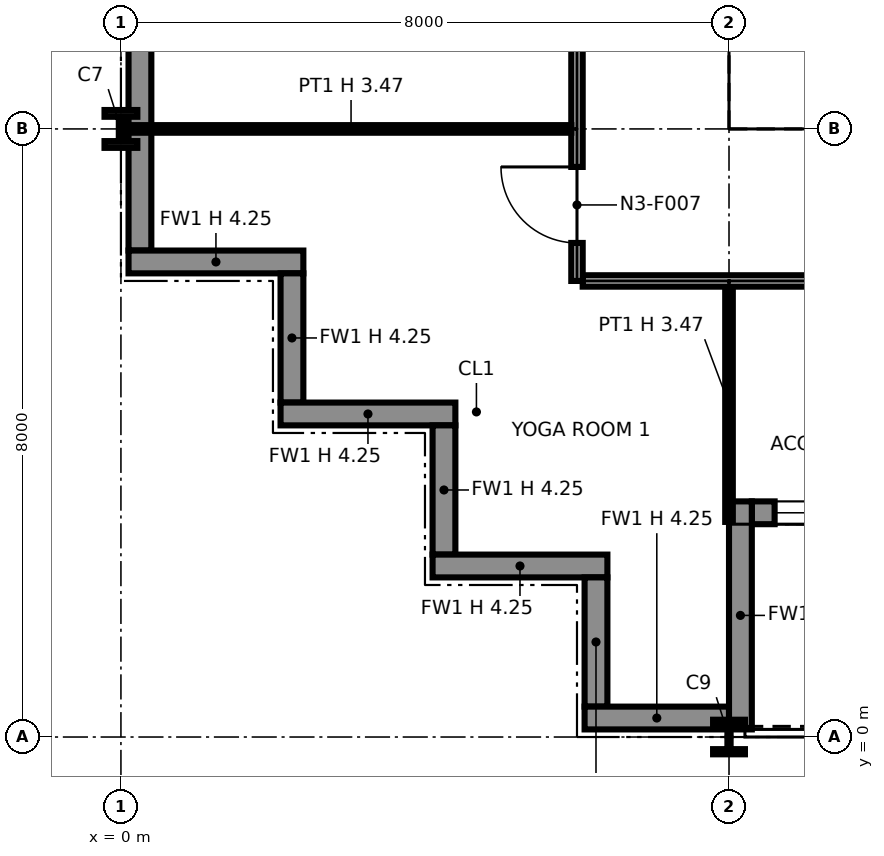
"""IFC4 building model, lengths in metres.
Left out: names, types, materials, properties, quantities, classifications, styles, units other than length and angle.
Written with IfcOpenShell. Run it as: python <this file> out.ifc"""

import sys

from ifc_helpers import new_model, si_unit, direction, frame, frame_2d, origin, origin_2d, place, context, subcontext, project, spatial, polyline, rectangle, i_section, outline, extrude, element, fill, save


model = new_model("IFC4")
c1 = context("Model", 3, precision=1e-05, world=origin(), true_north=direction((0.0, 1.0)))
c2 = subcontext(c1, "Body", "Model", "MODEL_VIEW")
j1 = project(units=[si_unit("LENGTHUNIT", "METRE"), si_unit("PLANEANGLEUNIT", "RADIAN")], contexts=[c1])
p1 = place(None, origin())
s1 = spatial("IfcSite", under=j1, at=p1, CompositionType="ELEMENT")
p2 = place(p1, origin())
s2 = spatial("IfcBuilding", under=s1, at=p2, CompositionType="ELEMENT")
p3 = place(p2, frame((0.0, 0.0, 70.0)))
s3 = spatial("IfcBuildingStorey", under=s2, at=p3, CompositionType="ELEMENT", Elevation=70.0)
p4 = place(p3, frame((0.0, 8.0, 0.0), z_axis=(0.0, 0.0, 1.0), x_axis=(1.0, 0.0, 0.0)))
e1 = element("IfcColumn", 1, at=p4, inside=s3, PredefinedType="COLUMN", context=c2, shape_type="SweptSolid", body=[
    extrude(i_section(OverallWidth=0.432, OverallDepth=0.498, WebThickness=0.056, FlangeThickness=0.089, at=origin_2d()), origin(), (0.0, 0.0, 1.0), 4.25),
])
p5 = place(p3, frame((8.0, 0.0, 0.0), z_axis=(0.0, 0.0, 1.0), x_axis=(1.0, 0.0, 0.0)))
e2 = element("IfcColumn", 2, at=p5, inside=s3, PredefinedType="COLUMN", context=c2, shape_type="SweptSolid", body=[
    extrude(i_section(OverallWidth=0.419, OverallDepth=0.455, WebThickness=0.042, FlangeThickness=0.068, at=origin_2d()), origin(), (0.0, 0.0, 1.0), 4.25),
])
p6 = place(p3, frame((8.0, 8.0, 0.0), z_axis=(0.0, 0.0, 1.0), x_axis=(1.0, 0.0, 0.0)))
e3 = element("IfcColumn", 3, at=p6, inside=s3, PredefinedType="COLUMN", context=c2, shape_type="SweptSolid", body=[
    extrude(i_section(OverallWidth=0.406, OverallDepth=0.417, WebThickness=0.03, FlangeThickness=0.048, at=origin_2d()), origin(), (0.0, 0.0, 1.0), 4.25),
])
p7 = place(p3, frame((0.25, 16.0, 0.0), z_axis=(0.0, 0.0, 1.0), x_axis=(0.0, -1.0, 0.0)))
e4 = element("IfcWall", 4, at=p7, inside=s3, PredefinedType="SOLIDWALL", context=c2, shape_type="SweptSolid", body=[
    extrude(rectangle(XDim=9.6, YDim=0.3, at=frame_2d((4.8, 0.0))), origin(), (0.0, 0.0, 1.0), 4.25),
])
p8 = place(p3, frame((0.1, 6.25, 0.0), z_axis=(0.0, 0.0, 1.0), x_axis=(1.0, 0.0, 0.0)))
e5 = element("IfcWall", 5, at=p8, inside=s3, PredefinedType="SOLIDWALL", context=c2, shape_type="SweptSolid", body=[
    extrude(rectangle(XDim=2.3, YDim=0.3, at=frame_2d((1.15, 0.0))), origin(), (0.0, 0.0, 1.0), 4.25),
])
p9 = place(p3, frame((2.25, 6.1, 0.0), z_axis=(0.0, 0.0, 1.0), x_axis=(0.0, -1.0, 0.0)))
e6 = element("IfcWall", 6, at=p9, inside=s3, PredefinedType="SOLIDWALL", context=c2, shape_type="SweptSolid", body=[
    extrude(rectangle(XDim=1.7, YDim=0.3, at=frame_2d((0.85, 0.0))), origin(), (0.0, 0.0, 1.0), 4.25),
])
p10 = place(p3, frame((2.1, 4.25, 0.0), z_axis=(0.0, 0.0, 1.0), x_axis=(1.0, 0.0, 0.0)))
e7 = element("IfcWall", 7, at=p10, inside=s3, PredefinedType="SOLIDWALL", context=c2, shape_type="SweptSolid", body=[
    extrude(rectangle(XDim=2.3, YDim=0.3, at=frame_2d((1.15, 0.0))), origin(), (0.0, 0.0, 1.0), 4.25),
])
p11 = place(p3, frame((4.25, 4.1, 0.0), z_axis=(0.0, 0.0, 1.0), x_axis=(0.0, -1.0, 0.0)))
e8 = element("IfcWall", 8, at=p11, inside=s3, PredefinedType="SOLIDWALL", context=c2, shape_type="SweptSolid", body=[
    extrude(rectangle(XDim=1.7, YDim=0.3, at=frame_2d((0.85, 0.0))), origin(), (0.0, 0.0, 1.0), 4.25),
])
p12 = place(p3, frame((4.1, 2.25, 0.0), z_axis=(0.0, 0.0, 1.0), x_axis=(1.0, 0.0, 0.0)))
e9 = element("IfcWall", 9, at=p12, inside=s3, PredefinedType="SOLIDWALL", context=c2, shape_type="SweptSolid", body=[
    extrude(rectangle(XDim=2.3, YDim=0.3, at=frame_2d((1.15, 0.0))), origin(), (0.0, 0.0, 1.0), 4.25),
])
p13 = place(p3, frame((6.25, 2.1, 0.0), z_axis=(0.0, 0.0, 1.0), x_axis=(0.0, -1.0, 0.0)))
e10 = element("IfcWall", 10, at=p13, inside=s3, PredefinedType="SOLIDWALL", context=c2, shape_type="SweptSolid", body=[
    extrude(rectangle(XDim=1.7, YDim=0.3, at=frame_2d((0.85, 0.0))), origin(), (0.0, 0.0, 1.0), 4.25),
])
p14 = place(p3, frame((6.1, 0.25, 0.0), z_axis=(0.0, 0.0, 1.0), x_axis=(1.0, 0.0, 0.0)))
e11 = element("IfcWall", 11, at=p14, inside=s3, PredefinedType="SOLIDWALL", context=c2, shape_type="SweptSolid", body=[
    extrude(rectangle(XDim=1.9, YDim=0.3, at=frame_2d((0.95, 0.0))), origin(), (0.0, 0.0, 1.0), 4.25),
])
p15 = place(p3, frame((8.3, 2.95, 0.0), z_axis=(0.0, 0.0, 1.0), x_axis=(1.0, 0.0, 0.0)))
e12 = element("IfcWall", 12, at=p15, inside=s3, PredefinedType="SOLIDWALL", context=c2, shape_type="SweptSolid", body=[
    extrude(rectangle(XDim=7.4, YDim=0.3, at=frame_2d((3.7, 0.0))), origin(), (0.0, 0.0, 1.0), 4.25),
])
p16 = place(p15, frame((0.3, 0.0, 0.9)))
e13 = element("IfcOpeningElement", 13, at=p16, cuts=e12, PredefinedType="OPENING", context=c2, shape_type="SweptSolid", body=[
    extrude(rectangle(XDim=2.8, YDim=2.2, at=frame_2d((1.4, 1.1))), frame((0.0, 0.16, 0.0), z_axis=(0.0, -1.0, 0.0), x_axis=(1.0, 0.0, 0.0)), (0.0, 0.0, 1.0), 0.32),
])
p17 = place(p15, frame((4.7, 0.0, 0.0)))
e14 = element("IfcOpeningElement", 14, at=p17, cuts=e12, PredefinedType="OPENING", context=c2, shape_type="SweptSolid", body=[
    extrude(rectangle(XDim=2.0, YDim=2.4, at=frame_2d((1.0, 1.2))), frame((0.0, 0.16, 0.0), z_axis=(0.0, -1.0, 0.0), x_axis=(1.0, 0.0, 0.0)), (0.0, 0.0, 1.0), 0.32),
])
p18 = place(p3, frame((8.15, 0.1, 0.0), z_axis=(0.0, 0.0, 1.0), x_axis=(0.0, 1.0, 0.0)))
e15 = element("IfcWall", 15, at=p18, inside=s3, PredefinedType="SOLIDWALL", context=c2, shape_type="SweptSolid", body=[
    extrude(rectangle(XDim=3.0, YDim=0.3, at=frame_2d((1.5, 0.0))), origin(), (0.0, 0.0, 1.0), 3.469),
])
p19 = place(p3, frame((8.65, 8.75, 0.0), z_axis=(0.0, 0.0, 1.0), x_axis=(1.0, 0.0, 0.0)))
e16 = element("IfcWall", 16, at=p19, inside=s3, PredefinedType="PARTITIONING", context=c2, shape_type="SweptSolid", body=[
    extrude(outline(polyline([(0.0, 0.0), (14.7, 0.0), (14.7, 4.25), (7.469, 4.25), (7.469, 3.632), (7.231, 3.632), (7.23, 4.25), (0.0, 4.25), (0.0, 0.0)])), frame((0.0, 0.1, 0.0), z_axis=(0.0, -1.0, 0.0), x_axis=(1.0, 0.0, 0.0)), (0.0, 0.0, 1.0), 0.2),
])
p20 = place(p19, frame((1.3, 0.0, 0.0)))
e17 = element("IfcOpeningElement", 17, at=p20, cuts=e16, PredefinedType="OPENING", context=c2, shape_type="SweptSolid", body=[
    extrude(rectangle(XDim=1.4, YDim=2.1, at=frame_2d((0.7, 1.05))), frame((0.0, 0.11, 0.0), z_axis=(0.0, -1.0, 0.0), x_axis=(1.0, 0.0, 0.0)), (0.0, 0.0, 1.0), 0.22),
])
p21 = place(p19, frame((4.6, 0.0, 0.0)))
e18 = element("IfcOpeningElement", 18, at=p21, cuts=e16, PredefinedType="OPENING", context=c2, shape_type="SweptSolid", body=[
    extrude(rectangle(XDim=1.4, YDim=2.1, at=frame_2d((0.7, 1.05))), frame((0.0, 0.11, 0.0), z_axis=(0.0, -1.0, 0.0), x_axis=(1.0, 0.0, 0.0)), (0.0, 0.0, 1.0), 0.22),
])
p22 = place(p19, frame((10.4, 0.0, 0.0)))
e19 = element("IfcOpeningElement", 19, at=p22, cuts=e16, PredefinedType="OPENING", context=c2, shape_type="SweptSolid", body=[
    extrude(rectangle(XDim=1.2, YDim=2.1, at=frame_2d((0.6, 1.05))), frame((0.0, 0.11, 0.0), z_axis=(0.0, -1.0, 0.0), x_axis=(1.0, 0.0, 0.0)), (0.0, 0.0, 1.0), 0.22),
])
p23 = place(p3, frame((8.75, 8.85, 0.0), z_axis=(0.0, 0.0, 1.0), x_axis=(0.0, 1.0, 0.0)))
e20 = element("IfcWall", 20, at=p23, inside=s3, PredefinedType="PARTITIONING", context=c2, shape_type="SweptSolid", body=[
    extrude(outline(polyline([(0.0, 0.0), (14.3, 0.0), (14.3, 4.25), (10.231, 4.25), (10.23, 3.789), (10.07, 3.789), (10.069, 4.25), (7.27, 4.25), (7.269, 3.632), (7.031, 3.632), (7.031, 4.25), (0.0, 4.25), (0.0, 0.0)])), frame((0.0, 0.1, 0.0), z_axis=(0.0, -1.0, 0.0), x_axis=(1.0, 0.0, 0.0)), (0.0, 0.0, 1.0), 0.2),
])
p24 = place(p23, frame((8.3, 0.0, 0.0)))
e21 = element("IfcOpeningElement", 21, at=p24, cuts=e20, PredefinedType="OPENING", context=c2, shape_type="SweptSolid", body=[
    extrude(rectangle(XDim=1.8, YDim=2.1, at=frame_2d((0.9, 1.05))), frame((0.0, 0.11, 0.0), z_axis=(0.0, -1.0, 0.0), x_axis=(1.0, 0.0, 0.0)), (0.0, 0.0, 1.0), 0.22),
])
p25 = place(p3, frame((8.0, 2.83, 0.0), z_axis=(0.0, 0.0, 1.0), x_axis=(0.0, 1.0, 0.0)))
e22 = element("IfcWall", 22, at=p25, inside=s3, PredefinedType="PARTITIONING", context=c2, shape_type="SweptSolid", body=[
    extrude(rectangle(XDim=3.095, YDim=0.1, at=frame_2d((1.547, 0.0))), origin(), (0.0, 0.0, 1.0), 3.47),
])
p26 = place(p3, frame((6.075, 6.0, 0.0), z_axis=(0.0, 0.0, 1.0), x_axis=(1.0, 0.0, 0.0)))
e23 = element("IfcWall", 23, at=p26, inside=s3, PredefinedType="PARTITIONING", context=c2, shape_type="SweptSolid", body=[
    extrude(rectangle(XDim=19.85, YDim=0.15, at=frame_2d((9.925, 0.0))), origin(), (0.0, 0.0, 1.0), 4.25),
])
p27 = place(p26, frame((12.425, 0.0, 0.0), z_axis=(0.0, 0.0, 1.0), x_axis=(-1.0, 0.0, 0.0)))
e24 = element("IfcOpeningElement", 24, at=p27, cuts=e23, PredefinedType="OPENING", context=c2, shape_type="SweptSolid", body=[
    extrude(rectangle(XDim=1.0, YDim=2.1, at=frame_2d((0.5, 1.05))), frame((0.0, 0.085, 0.0), z_axis=(0.0, -1.0, 0.0), x_axis=(1.0, 0.0, 0.0)), (0.0, 0.0, 1.0), 0.17),
])
p28 = place(p26, frame((16.425, 0.0, 0.0), z_axis=(0.0, 0.0, 1.0), x_axis=(-1.0, 0.0, 0.0)))
e25 = element("IfcOpeningElement", 25, at=p28, cuts=e23, PredefinedType="OPENING", context=c2, shape_type="SweptSolid", body=[
    extrude(rectangle(XDim=1.0, YDim=2.1, at=frame_2d((0.5, 1.05))), frame((0.0, 0.085, 0.0), z_axis=(0.0, -1.0, 0.0), x_axis=(1.0, 0.0, 0.0)), (0.0, 0.0, 1.0), 0.17),
])
p29 = place(p26, frame((4.425, 0.0, 0.0), z_axis=(0.0, 0.0, 1.0), x_axis=(-1.0, 0.0, 0.0)))
e26 = element("IfcOpeningElement", 26, at=p29, cuts=e23, PredefinedType="OPENING", context=c2, shape_type="SweptSolid", body=[
    extrude(rectangle(XDim=1.0, YDim=2.1, at=frame_2d((0.5, 1.05))), frame((0.0, 0.085, 0.0), z_axis=(0.0, -1.0, 0.0), x_axis=(1.0, 0.0, 0.0)), (0.0, 0.0, 1.0), 0.17),
])
p30 = place(p26, frame((8.425, 0.0, 0.0), z_axis=(0.0, 0.0, 1.0), x_axis=(-1.0, 0.0, 0.0)))
e27 = element("IfcOpeningElement", 27, at=p30, cuts=e23, PredefinedType="OPENING", context=c2, shape_type="SweptSolid", body=[
    extrude(rectangle(XDim=1.0, YDim=2.1, at=frame_2d((0.5, 1.05))), frame((0.0, 0.085, 0.0), z_axis=(0.0, -1.0, 0.0), x_axis=(1.0, 0.0, 0.0)), (0.0, 0.0, 1.0), 0.17),
])
p31 = place(p26, frame((19.425, 0.0, 0.0), z_axis=(0.0, 0.0, 1.0), x_axis=(-1.0, 0.0, 0.0)))
e28 = element("IfcOpeningElement", 28, at=p31, cuts=e23, PredefinedType="OPENING", context=c2, shape_type="SweptSolid", body=[
    extrude(rectangle(XDim=1.0, YDim=2.1, at=frame_2d((0.5, 1.05))), frame((0.0, 0.085, 0.0), z_axis=(0.0, -1.0, 0.0), x_axis=(1.0, 0.0, 0.0)), (0.0, 0.0, 1.0), 0.17),
])
p32 = place(p3, frame((6.0, 6.0, 0.0), z_axis=(0.0, 0.0, 1.0), x_axis=(0.0, 1.0, 0.0)))
e29 = element("IfcWall", 29, at=p32, inside=s3, PredefinedType="PARTITIONING", context=c2, shape_type="SweptSolid", body=[
    extrude(outline(polyline([(0.0, 0.0), (19.925, 0.0), (19.925, 4.25), (18.3, 4.25), (18.298, 3.47), (17.702, 3.47), (17.7, 4.25), (14.3, 4.25), (14.298, 3.47), (13.702, 3.47), (13.7, 4.25), (10.3, 4.25), (10.298, 3.47), (9.702, 3.47), (9.7, 4.25), (6.3, 4.25), (6.298, 3.47), (5.702, 3.47), (5.7, 4.25), (2.3, 4.25), (2.298, 3.47), (1.702, 3.47), (1.7, 4.25), (0.0, 4.25), (0.0, 0.0)])), frame((0.0, 0.075, 0.0), z_axis=(0.0, -1.0, 0.0), x_axis=(1.0, 0.0, 0.0)), (0.0, 0.0, 1.0), 0.15),
])
p33 = place(p32, frame((0.5, 0.0, 0.0)))
e30 = element("IfcOpeningElement", 30, at=p33, cuts=e29, PredefinedType="OPENING", context=c2, shape_type="SweptSolid", body=[
    extrude(rectangle(XDim=1.0, YDim=2.1, at=frame_2d((0.5, 1.05))), frame((0.0, 0.085, 0.0), z_axis=(0.0, -1.0, 0.0), x_axis=(1.0, 0.0, 0.0)), (0.0, 0.0, 1.0), 0.17),
])
p34 = place(p32, frame((3.5, 0.0, 0.0)))
e31 = element("IfcOpeningElement", 31, at=p34, cuts=e29, PredefinedType="OPENING", context=c2, shape_type="SweptSolid", body=[
    extrude(rectangle(XDim=1.0, YDim=2.1, at=frame_2d((0.5, 1.05))), frame((0.0, 0.085, 0.0), z_axis=(0.0, -1.0, 0.0), x_axis=(1.0, 0.0, 0.0)), (0.0, 0.0, 1.0), 0.17),
])
p35 = place(p32, frame((7.5, 0.0, 0.0)))
e32 = element("IfcOpeningElement", 32, at=p35, cuts=e29, PredefinedType="OPENING", context=c2, shape_type="SweptSolid", body=[
    extrude(rectangle(XDim=1.0, YDim=2.1, at=frame_2d((0.5, 1.05))), frame((0.0, 0.085, 0.0), z_axis=(0.0, -1.0, 0.0), x_axis=(1.0, 0.0, 0.0)), (0.0, 0.0, 1.0), 0.17),
])
p36 = place(p32, frame((15.225, 0.0, 0.0)))
e33 = element("IfcOpeningElement", 33, at=p36, cuts=e29, PredefinedType="OPENING", context=c2, shape_type="SweptSolid", body=[
    extrude(rectangle(XDim=1.0, YDim=2.1, at=frame_2d((0.5, 1.05))), frame((0.0, 0.085, 0.0), z_axis=(0.0, -1.0, 0.0), x_axis=(1.0, 0.0, 0.0)), (0.0, 0.0, 1.0), 0.17),
])
p37 = place(p3, frame((0.13, 8.0, 0.0), z_axis=(0.0, 0.0, 1.0), x_axis=(1.0, 0.0, 0.0)))
e34 = element("IfcWall", 34, at=p37, inside=s3, PredefinedType="PARTITIONING", context=c2, shape_type="SweptSolid", body=[
    extrude(rectangle(XDim=5.795, YDim=0.1, at=frame_2d((2.897, 0.0))), origin(), (0.0, 0.0, 1.0), 3.47),
])
p38 = place(p16, origin())
e35 = element("IfcWindow", 35, at=p38, inside=s3, PartitioningType="SINGLE_PANEL", PredefinedType="WINDOW", context=c2, shape_type="SweptSolid", body=[
    extrude(rectangle(XDim=2.8, YDim=2.2, at=frame_2d((1.4, 1.1))), frame((0.0, 0.03, 0.0), z_axis=(0.0, -1.0, 0.0), x_axis=(1.0, 0.0, 0.0)), (0.0, 0.0, 1.0), 0.06),
])
fill(e13, e35)
p39 = place(p33, origin())
e36 = element("IfcDoor", 36, at=p39, inside=s3, OperationType="SINGLE_SWING_RIGHT", PredefinedType="DOOR", context=c2, shape_type="SweptSolid", body=[
    extrude(rectangle(XDim=1.0, YDim=2.1, at=frame_2d((0.5, 1.05))), frame((0.0, 0.025, 0.0), z_axis=(0.0, -1.0, 0.0), x_axis=(1.0, 0.0, 0.0)), (0.0, 0.0, 1.0), 0.05),
])
fill(e30, e36)
save(model, sys.argv[1])
